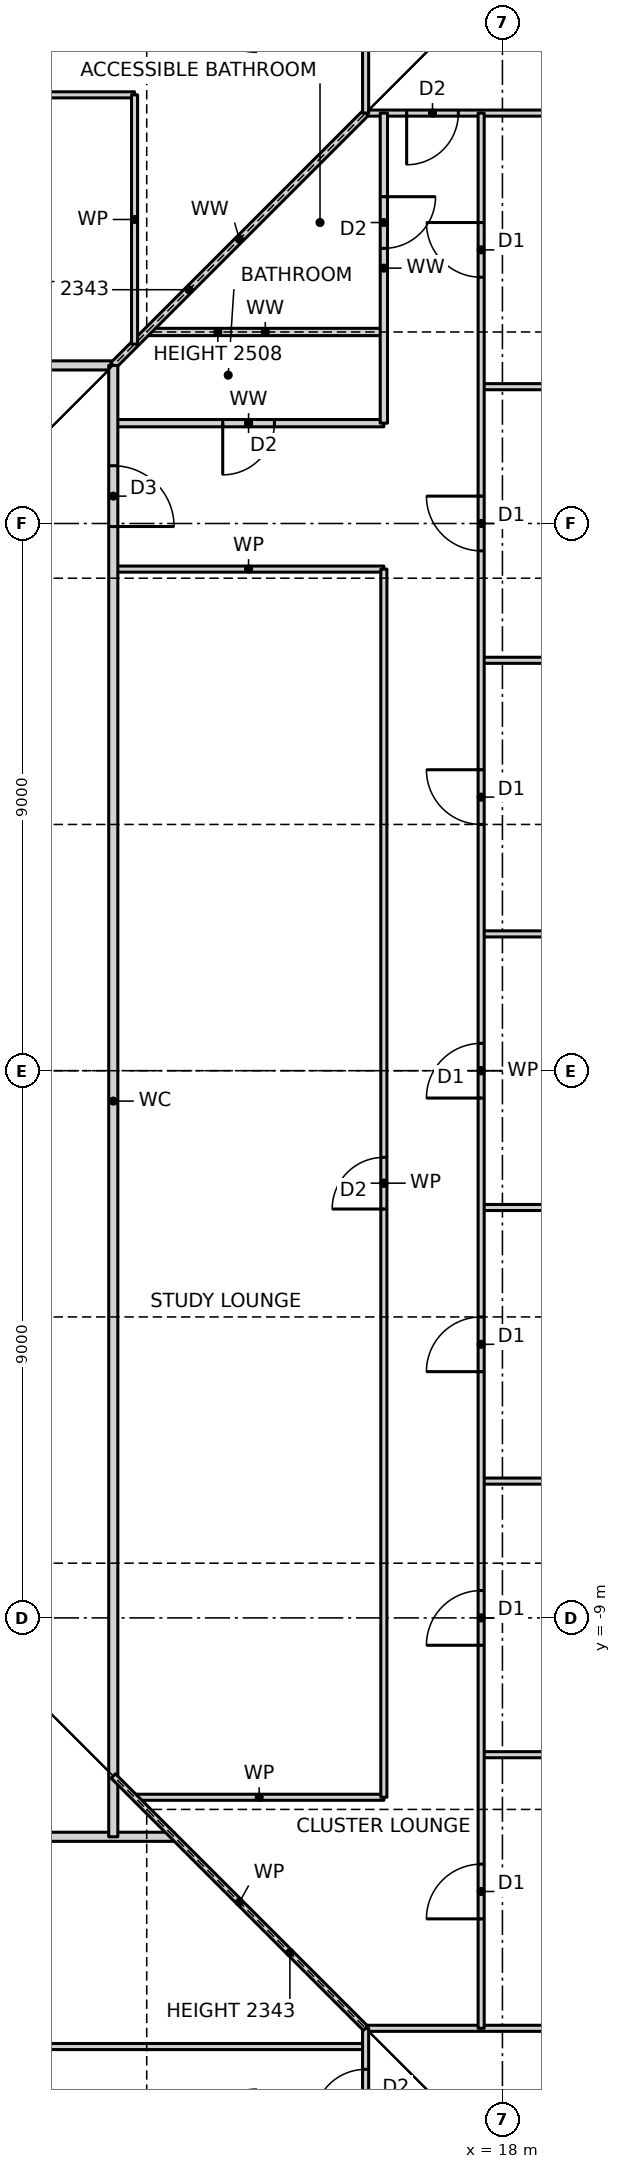
"""IFC4 building model, lengths in metres.
Left out: names, types, materials, properties, quantities, classifications, styles, units other than length and angle.
Written with IfcOpenShell. Run it as: python <this file> out.ifc"""

import sys

from ifc_helpers import new_model, si_unit, direction, frame, frame_2d, origin, place, context, subcontext, project, spatial, rectangle, extrude, element, fill, save


model = new_model("IFC4")
c1 = context("Model", 3, precision=1e-05, world=origin(), true_north=direction((0.0, 1.0)))
c2 = subcontext(c1, "Body", "Model", "MODEL_VIEW")
j1 = project(units=[si_unit("LENGTHUNIT", "METRE"), si_unit("PLANEANGLEUNIT", "RADIAN")], contexts=[c1])
p1 = place(None, origin())
s1 = spatial("IfcSite", under=j1, at=p1, CompositionType="ELEMENT")
p2 = place(p1, origin())
s2 = spatial("IfcBuilding", under=s1, at=p2, CompositionType="ELEMENT")
p3 = place(p2, frame((0.0, 0.0, 18.5)))
s3 = spatial("IfcBuildingStorey", under=s2, at=p3, CompositionType="ELEMENT", Elevation=18.5)
p4 = place(p3, frame((-2.15, -16.05, 0.0), z_axis=(0.0, 0.0, 1.0), x_axis=(1.0, 0.0, 0.0)))
e1 = element("IfcWall", 1, at=p4, inside=s3, PredefinedType="PARTITIONING", context=c2, shape_type="SweptSolid", body=[
    extrude(rectangle(XDim=17.9, YDim=0.1, at=frame_2d((8.95, 0.0))), origin(), (0.0, 0.0, 1.0), 3.27),
])
p5 = place(p4, frame((8.525, 0.0, 0.0)))
e2 = element("IfcOpeningElement", 2, at=p5, cuts=e1, PredefinedType="OPENING", context=c2, shape_type="SweptSolid", body=[
    extrude(rectangle(XDim=0.85, YDim=2.1, at=frame_2d((0.425, 1.05))), frame((0.0, 0.06, 0.0), z_axis=(0.0, -1.0, 0.0), x_axis=(1.0, 0.0, 0.0)), (0.0, 0.0, 1.0), 0.12),
])
p6 = place(p3, frame((15.75, -15.75, 0.0), z_axis=(0.0, 0.0, 1.0), x_axis=(1.0, 0.0, 0.0)))
e3 = element("IfcWall", 3, at=p6, inside=s3, PredefinedType="PARTITIONING", context=c2, shape_type="SweptSolid", body=[
    extrude(rectangle(XDim=7.44, YDim=0.1, at=frame_2d((3.72, 0.0))), origin(), (0.0, 0.0, 1.0), 3.27),
])
p7 = place(p3, frame((-12.6, -12.6, 0.0), z_axis=(0.0, 0.0, 1.0), x_axis=(1.0, 0.0, 0.0)))
e4 = element("IfcWall", 4, at=p7, inside=s3, PredefinedType="PARTITIONING", context=c2, shape_type="SweptSolid", body=[
    extrude(rectangle(XDim=25.2, YDim=0.15, at=frame_2d((12.6, 0.0))), origin(), (0.0, 0.0, 1.0), 3.27),
])
p8 = place(p7, frame((8.05, 0.0, 0.0)))
e5 = element("IfcOpeningElement", 5, at=p8, cuts=e4, PredefinedType="OPENING", context=c2, shape_type="SweptSolid", body=[
    extrude(rectangle(XDim=1.0, YDim=2.1, at=frame_2d((0.5, 1.05))), frame((0.0, 0.085, 0.0), z_axis=(0.0, -1.0, 0.0), x_axis=(1.0, 0.0, 0.0)), (0.0, 0.0, 1.0), 0.17),
])
p9 = place(p7, frame((5.3, 0.0, 0.0)))
e6 = element("IfcOpeningElement", 6, at=p9, cuts=e4, PredefinedType="OPENING", context=c2, shape_type="SweptSolid", body=[
    extrude(rectangle(XDim=0.9, YDim=2.1, at=frame_2d((0.45, 1.05))), frame((0.0, 0.085, 0.0), z_axis=(0.0, -1.0, 0.0), x_axis=(1.0, 0.0, 0.0)), (0.0, 0.0, 1.0), 0.17),
])
p10 = place(p3, frame((11.95, -11.95, 0.0), z_axis=(0.0, 0.0, 1.0), x_axis=(1.0, 0.0, 0.0)))
e7 = element("IfcWall", 7, at=p10, inside=s3, PredefinedType="PARTITIONING", context=c2, shape_type="SweptSolid", body=[
    extrude(rectangle(XDim=4.1, YDim=0.1, at=frame_2d((2.05, 0.0))), origin(), (0.0, 0.0, 1.0), 3.27),
])
for number, where, z_axis, x_axis in (
    (8, (17.65, -11.25, 0.0), (0.0, 0.0, 1.0), (1.0, 0.0, 0.0)),
    (9, (17.65, -6.75, 0.0), (0.0, 0.0, 1.0), (1.0, 0.0, 0.0)),
    (10, (17.65, -2.25, 0.0), (0.0, 0.0, 1.0), (1.0, 0.0, 0.0)),
    (11, (17.65, 2.25, 0.0), (0.0, 0.0, 1.0), (1.0, 0.0, 0.0)),
    (12, (17.65, 6.75, 0.0), (0.0, 0.0, 1.0), (1.0, 0.0, 0.0)),
):
    element("IfcWall", number, at=place(p3, frame(where, z_axis=z_axis, x_axis=x_axis)), inside=s3, PredefinedType="PARTITIONING", context=c2, shape_type="SweptSolid", body=[
        extrude(rectangle(XDim=5.54, YDim=0.1, at=frame_2d((2.77, 0.0))), origin(), (0.0, 0.0, 1.0), 3.27),
    ])
p11 = place(p3, frame((11.6, 8.25, 0.0), z_axis=(0.0, 0.0, 1.0), x_axis=(1.0, 0.0, 0.0)))
e13 = element("IfcWall", 13, at=p11, inside=s3, PredefinedType="PARTITIONING", context=c2, shape_type="SweptSolid", body=[
    extrude(rectangle(XDim=4.45, YDim=0.1, at=frame_2d((2.225, 0.0))), origin(), (0.0, 0.0, 1.0), 3.27),
])
p12 = place(p3, frame((11.6, 10.65, 0.0), z_axis=(0.0, 0.0, 1.0), x_axis=(1.0, 0.0, 0.0)))
e14 = element("IfcWall", 14, at=p12, inside=s3, PredefinedType="PARTITIONING", context=c2, shape_type="SweptSolid", body=[
    extrude(rectangle(XDim=4.45, YDim=0.12, at=frame_2d((2.225, 0.0))), origin(), (0.0, 0.0, 1.0), 3.27),
])
p13 = place(p12, frame((1.8, 0.0, 0.0)))
e15 = element("IfcOpeningElement", 15, at=p13, cuts=e14, PredefinedType="OPENING", context=c2, shape_type="SweptSolid", body=[
    extrude(rectangle(XDim=0.85, YDim=2.1, at=frame_2d((0.425, 1.05))), frame((0.0, 0.07, 0.0), z_axis=(0.0, -1.0, 0.0), x_axis=(1.0, 0.0, 0.0)), (0.0, 0.0, 1.0), 0.14),
])
p14 = place(p3, frame((17.65, 11.25, 0.0), z_axis=(0.0, 0.0, 1.0), x_axis=(1.0, 0.0, 0.0)))
e16 = element("IfcWall", 16, at=p14, inside=s3, PredefinedType="PARTITIONING", context=c2, shape_type="SweptSolid", body=[
    extrude(rectangle(XDim=5.54, YDim=0.1, at=frame_2d((2.77, 0.0))), origin(), (0.0, 0.0, 1.0), 3.27),
])
p15 = place(p3, frame((-11.6, 11.6, 0.0), z_axis=(0.0, 0.0, 1.0), x_axis=(1.0, 0.0, 0.0)))
e17 = element("IfcWall", 17, at=p15, inside=s3, PredefinedType="PARTITIONING", context=c2, shape_type="SweptSolid", body=[
    extrude(rectangle(XDim=23.2, YDim=0.15, at=frame_2d((11.6, 0.0))), origin(), (0.0, 0.0, 1.0), 3.27),
])
p16 = place(p15, frame((1.65, 0.0, 0.0)))
e18 = element("IfcOpeningElement", 18, at=p16, cuts=e17, PredefinedType="OPENING", context=c2, shape_type="SweptSolid", body=[
    extrude(rectangle(XDim=1.0, YDim=2.1, at=frame_2d((0.5, 1.05))), frame((0.0, 0.085, 0.0), z_axis=(0.0, -1.0, 0.0), x_axis=(1.0, 0.0, 0.0)), (0.0, 0.0, 1.0), 0.17),
])
p17 = place(p3, frame((12.15, 12.15, 0.0), z_axis=(0.0, 0.0, 1.0), x_axis=(1.0, 0.0, 0.0)))
e19 = element("IfcWall", 19, at=p17, inside=s3, PredefinedType="PARTITIONING", context=c2, shape_type="SweptSolid", body=[
    extrude(rectangle(XDim=3.9, YDim=0.12, at=frame_2d((1.95, 0.0))), origin(), (0.0, 0.0, 1.0), 2.508),
])
p18 = place(p3, frame((15.75, 15.75, 0.0), z_axis=(0.0, 0.0, 1.0), x_axis=(1.0, 0.0, 0.0)))
e20 = element("IfcWall", 20, at=p18, inside=s3, PredefinedType="PARTITIONING", context=c2, shape_type="SweptSolid", body=[
    extrude(rectangle(XDim=7.44, YDim=0.1, at=frame_2d((3.72, 0.0))), origin(), (0.0, 0.0, 1.0), 3.27),
])
p19 = place(p18, frame((0.675, 0.0, 0.0)))
e21 = element("IfcOpeningElement", 21, at=p19, cuts=e20, PredefinedType="OPENING", context=c2, shape_type="SweptSolid", body=[
    extrude(rectangle(XDim=0.85, YDim=2.1, at=frame_2d((0.425, 1.05))), frame((0.0, 0.06, 0.0), z_axis=(0.0, -1.0, 0.0), x_axis=(1.0, 0.0, 0.0)), (0.0, 0.0, 1.0), 0.12),
])
p20 = place(p3, frame((-8.25, 16.05, 0.0), z_axis=(0.0, 0.0, 1.0), x_axis=(1.0, 0.0, 0.0)))
e22 = element("IfcWall", 22, at=p20, inside=s3, PredefinedType="PARTITIONING", context=c2, shape_type="SweptSolid", body=[
    extrude(rectangle(XDim=20.2, YDim=0.1, at=frame_2d((10.1, 0.0))), origin(), (0.0, 0.0, 1.0), 3.27),
])
p21 = place(p20, frame((9.675, 0.0, 0.0)))
e23 = element("IfcOpeningElement", 23, at=p21, cuts=e22, PredefinedType="OPENING", context=c2, shape_type="SweptSolid", body=[
    extrude(rectangle(XDim=0.85, YDim=2.1, at=frame_2d((0.425, 1.05))), frame((0.0, 0.06, 0.0), z_axis=(0.0, -1.0, 0.0), x_axis=(1.0, 0.0, 0.0)), (0.0, 0.0, 1.0), 0.12),
])
p22 = place(p3, frame((11.6, 11.6, 0.0), z_axis=(0.0, 0.0, 1.0), x_axis=(0.707106781187, 0.707106781187, 0.0)))
e24 = element("IfcWall", 24, at=p22, inside=s3, PredefinedType="PARTITIONING", context=c2, shape_type="SweptSolid", body=[
    extrude(rectangle(XDim=5.869, YDim=0.12, at=frame_2d((2.935, 0.0))), origin(), (0.0, 0.0, 1.0), 2.343),
])
p23 = place(p3, frame((17.65, -15.75, 0.0), z_axis=(0.0, 0.0, 1.0), x_axis=(0.0, 1.0, 0.0)))
e25 = element("IfcWall", 25, at=p23, inside=s3, PredefinedType="PARTITIONING", context=c2, shape_type="SweptSolid", body=[
    extrude(rectangle(XDim=31.5, YDim=0.1, at=frame_2d((15.75, 0.0))), origin(), (0.0, 0.0, 1.0), 3.27),
])
p24 = place(p23, frame((1.8, 0.0, 0.0)))
e26 = element("IfcOpeningElement", 26, at=p24, cuts=e25, PredefinedType="OPENING", context=c2, shape_type="SweptSolid", body=[
    extrude(rectangle(XDim=0.9, YDim=2.1, at=frame_2d((0.45, 1.05))), frame((0.0, 0.06, 0.0), z_axis=(0.0, -1.0, 0.0), x_axis=(1.0, 0.0, 0.0)), (0.0, 0.0, 1.0), 0.12),
])
p25 = place(p23, frame((6.3, 0.0, 0.0)))
e27 = element("IfcOpeningElement", 27, at=p25, cuts=e25, PredefinedType="OPENING", context=c2, shape_type="SweptSolid", body=[
    extrude(rectangle(XDim=0.9, YDim=2.1, at=frame_2d((0.45, 1.05))), frame((0.0, 0.06, 0.0), z_axis=(0.0, -1.0, 0.0), x_axis=(1.0, 0.0, 0.0)), (0.0, 0.0, 1.0), 0.12),
])
p26 = place(p23, frame((10.8, 0.0, 0.0)))
e28 = element("IfcOpeningElement", 28, at=p26, cuts=e25, PredefinedType="OPENING", context=c2, shape_type="SweptSolid", body=[
    extrude(rectangle(XDim=0.9, YDim=2.1, at=frame_2d((0.45, 1.05))), frame((0.0, 0.06, 0.0), z_axis=(0.0, -1.0, 0.0), x_axis=(1.0, 0.0, 0.0)), (0.0, 0.0, 1.0), 0.12),
])
p27 = place(p23, frame((15.3, 0.0, 0.0)))
e29 = element("IfcOpeningElement", 29, at=p27, cuts=e25, PredefinedType="OPENING", context=c2, shape_type="SweptSolid", body=[
    extrude(rectangle(XDim=0.9, YDim=2.1, at=frame_2d((0.45, 1.05))), frame((0.0, 0.06, 0.0), z_axis=(0.0, -1.0, 0.0), x_axis=(1.0, 0.0, 0.0)), (0.0, 0.0, 1.0), 0.12),
])
p28 = place(p23, frame((19.8, 0.0, 0.0)))
e30 = element("IfcOpeningElement", 30, at=p28, cuts=e25, PredefinedType="OPENING", context=c2, shape_type="SweptSolid", body=[
    extrude(rectangle(XDim=0.9, YDim=2.1, at=frame_2d((0.45, 1.05))), frame((0.0, 0.06, 0.0), z_axis=(0.0, -1.0, 0.0), x_axis=(1.0, 0.0, 0.0)), (0.0, 0.0, 1.0), 0.12),
])
p29 = place(p23, frame((24.3, 0.0, 0.0)))
e31 = element("IfcOpeningElement", 31, at=p29, cuts=e25, PredefinedType="OPENING", context=c2, shape_type="SweptSolid", body=[
    extrude(rectangle(XDim=0.9, YDim=2.1, at=frame_2d((0.45, 1.05))), frame((0.0, 0.06, 0.0), z_axis=(0.0, -1.0, 0.0), x_axis=(1.0, 0.0, 0.0)), (0.0, 0.0, 1.0), 0.12),
])
p30 = place(p23, frame((28.8, 0.0, 0.0)))
e32 = element("IfcOpeningElement", 32, at=p30, cuts=e25, PredefinedType="OPENING", context=c2, shape_type="SweptSolid", body=[
    extrude(rectangle(XDim=0.9, YDim=2.1, at=frame_2d((0.45, 1.05))), frame((0.0, 0.06, 0.0), z_axis=(0.0, -1.0, 0.0), x_axis=(1.0, 0.0, 0.0)), (0.0, 0.0, 1.0), 0.12),
])
p31 = place(p3, frame((16.05, -11.95, 0.0), z_axis=(0.0, 0.0, 1.0), x_axis=(0.0, 1.0, 0.0)))
e33 = element("IfcWall", 33, at=p31, inside=s3, PredefinedType="PARTITIONING", context=c2, shape_type="SweptSolid", body=[
    extrude(rectangle(XDim=20.2, YDim=0.1, at=frame_2d((10.1, 0.0))), origin(), (0.0, 0.0, 1.0), 3.27),
])
p32 = place(p31, frame((9.675, 0.0, 0.0)))
e34 = element("IfcOpeningElement", 34, at=p32, cuts=e33, PredefinedType="OPENING", context=c2, shape_type="SweptSolid", body=[
    extrude(rectangle(XDim=0.85, YDim=2.1, at=frame_2d((0.425, 1.05))), frame((0.0, 0.06, 0.0), z_axis=(0.0, -1.0, 0.0), x_axis=(1.0, 0.0, 0.0)), (0.0, 0.0, 1.0), 0.12),
])
p33 = place(p3, frame((16.05, 10.65, 0.0), z_axis=(0.0, 0.0, 1.0), x_axis=(0.0, 1.0, 0.0)))
e35 = element("IfcWall", 35, at=p33, inside=s3, PredefinedType="PARTITIONING", context=c2, shape_type="SweptSolid", body=[
    extrude(rectangle(XDim=5.1, YDim=0.12, at=frame_2d((2.55, 0.0))), origin(), (0.0, 0.0, 1.0), 3.27),
])
p34 = place(p33, frame((2.875, 0.0, 0.0)))
e36 = element("IfcOpeningElement", 36, at=p34, cuts=e35, PredefinedType="OPENING", context=c2, shape_type="SweptSolid", body=[
    extrude(rectangle(XDim=0.85, YDim=2.1, at=frame_2d((0.425, 1.05))), frame((0.0, 0.07, 0.0), z_axis=(0.0, -1.0, 0.0), x_axis=(1.0, 0.0, 0.0)), (0.0, 0.0, 1.0), 0.14),
])
p35 = place(p3, frame((15.75, -23.19, 0.0), z_axis=(0.0, 0.0, 1.0), x_axis=(0.0, 1.0, 0.0)))
e37 = element("IfcWall", 37, at=p35, inside=s3, PredefinedType="PARTITIONING", context=c2, shape_type="SweptSolid", body=[
    extrude(rectangle(XDim=7.44, YDim=0.1, at=frame_2d((3.72, 0.0))), origin(), (0.0, 0.0, 1.0), 3.27),
])
p36 = place(p35, frame((5.915, 0.0, 0.0)))
e38 = element("IfcOpeningElement", 38, at=p36, cuts=e37, PredefinedType="OPENING", context=c2, shape_type="SweptSolid", body=[
    extrude(rectangle(XDim=0.85, YDim=2.1, at=frame_2d((0.425, 1.05))), frame((0.0, 0.06, 0.0), z_axis=(0.0, -1.0, 0.0), x_axis=(1.0, 0.0, 0.0)), (0.0, 0.0, 1.0), 0.12),
])
p37 = place(p3, frame((15.75, 15.75, 0.0), z_axis=(0.0, 0.0, 1.0), x_axis=(0.0, 1.0, 0.0)))
e39 = element("IfcWall", 39, at=p37, inside=s3, PredefinedType="PARTITIONING", context=c2, shape_type="SweptSolid", body=[
    extrude(rectangle(XDim=7.44, YDim=0.1, at=frame_2d((3.72, 0.0))), origin(), (0.0, 0.0, 1.0), 3.27),
])
p38 = place(p3, frame((11.95, 11.95, 0.0), z_axis=(0.0, 0.0, 1.0), x_axis=(0.0, 1.0, 0.0)))
e40 = element("IfcWall", 40, at=p38, inside=s3, PredefinedType="PARTITIONING", context=c2, shape_type="SweptSolid", body=[
    extrude(rectangle(XDim=4.1, YDim=0.1, at=frame_2d((2.05, 0.0))), origin(), (0.0, 0.0, 1.0), 3.27),
])
p39 = place(p3, frame((11.6, -12.6, 0.0), z_axis=(0.0, 0.0, 1.0), x_axis=(0.0, 1.0, 0.0)))
e41 = element("IfcWall", 41, at=p39, inside=s3, PredefinedType="PARTITIONING", context=c2, shape_type="SweptSolid", body=[
    extrude(rectangle(XDim=24.2, YDim=0.15, at=frame_2d((12.1, 0.0))), origin(), (0.0, 0.0, 1.0), 3.27),
])
p40 = place(p39, frame((21.55, 0.0, 0.0)))
e42 = element("IfcOpeningElement", 42, at=p40, cuts=e41, PredefinedType="OPENING", context=c2, shape_type="SweptSolid", body=[
    extrude(rectangle(XDim=1.0, YDim=2.1, at=frame_2d((0.5, 1.05))), frame((0.0, 0.085, 0.0), z_axis=(0.0, -1.0, 0.0), x_axis=(1.0, 0.0, 0.0)), (0.0, 0.0, 1.0), 0.17),
])
p41 = place(p3, frame((15.75, -15.75, 0.0), z_axis=(0.0, 0.0, 1.0), x_axis=(-0.707106781187, 0.707106781187, 0.0)))
e43 = element("IfcWall", 43, at=p41, inside=s3, PredefinedType="PARTITIONING", context=c2, shape_type="SweptSolid", body=[
    extrude(rectangle(XDim=5.869, YDim=0.1, at=frame_2d((2.935, 0.0))), origin(), (0.0, 0.0, 1.0), 2.343),
])
p42 = place(p24, origin())
e44 = element("IfcDoor", 44, at=p42, inside=s3, OperationType="SINGLE_SWING_LEFT", PredefinedType="DOOR", context=c2, shape_type="SweptSolid", body=[
    extrude(rectangle(XDim=0.9, YDim=2.1, at=frame_2d((0.45, 1.05))), frame((0.0, 0.025, 0.0), z_axis=(0.0, -1.0, 0.0), x_axis=(1.0, 0.0, 0.0)), (0.0, 0.0, 1.0), 0.05),
])
fill(e26, e44)
p43 = place(p25, origin())
e45 = element("IfcDoor", 45, at=p43, inside=s3, OperationType="SINGLE_SWING_LEFT", PredefinedType="DOOR", context=c2, shape_type="SweptSolid", body=[
    extrude(rectangle(XDim=0.9, YDim=2.1, at=frame_2d((0.45, 1.05))), frame((0.0, 0.025, 0.0), z_axis=(0.0, -1.0, 0.0), x_axis=(1.0, 0.0, 0.0)), (0.0, 0.0, 1.0), 0.05),
])
fill(e27, e45)
p44 = place(p26, origin())
e46 = element("IfcDoor", 46, at=p44, inside=s3, OperationType="SINGLE_SWING_LEFT", PredefinedType="DOOR", context=c2, shape_type="SweptSolid", body=[
    extrude(rectangle(XDim=0.9, YDim=2.1, at=frame_2d((0.45, 1.05))), frame((0.0, 0.025, 0.0), z_axis=(0.0, -1.0, 0.0), x_axis=(1.0, 0.0, 0.0)), (0.0, 0.0, 1.0), 0.05),
])
fill(e28, e46)
p45 = place(p27, origin())
e47 = element("IfcDoor", 47, at=p45, inside=s3, OperationType="SINGLE_SWING_LEFT", PredefinedType="DOOR", context=c2, shape_type="SweptSolid", body=[
    extrude(rectangle(XDim=0.9, YDim=2.1, at=frame_2d((0.45, 1.05))), frame((0.0, 0.025, 0.0), z_axis=(0.0, -1.0, 0.0), x_axis=(1.0, 0.0, 0.0)), (0.0, 0.0, 1.0), 0.05),
])
fill(e29, e47)
p46 = place(p28, origin())
e48 = element("IfcDoor", 48, at=p46, inside=s3, OperationType="SINGLE_SWING_RIGHT", PredefinedType="DOOR", context=c2, shape_type="SweptSolid", body=[
    extrude(rectangle(XDim=0.9, YDim=2.1, at=frame_2d((0.45, 1.05))), frame((0.0, 0.025, 0.0), z_axis=(0.0, -1.0, 0.0), x_axis=(1.0, 0.0, 0.0)), (0.0, 0.0, 1.0), 0.05),
])
fill(e30, e48)
p47 = place(p29, origin())
e49 = element("IfcDoor", 49, at=p47, inside=s3, OperationType="SINGLE_SWING_RIGHT", PredefinedType="DOOR", context=c2, shape_type="SweptSolid", body=[
    extrude(rectangle(XDim=0.9, YDim=2.1, at=frame_2d((0.45, 1.05))), frame((0.0, 0.025, 0.0), z_axis=(0.0, -1.0, 0.0), x_axis=(1.0, 0.0, 0.0)), (0.0, 0.0, 1.0), 0.05),
])
fill(e31, e49)
p48 = place(p30, origin())
e50 = element("IfcDoor", 50, at=p48, inside=s3, OperationType="SINGLE_SWING_RIGHT", PredefinedType="DOOR", context=c2, shape_type="SweptSolid", body=[
    extrude(rectangle(XDim=0.9, YDim=2.1, at=frame_2d((0.45, 1.05))), frame((0.0, 0.025, 0.0), z_axis=(0.0, -1.0, 0.0), x_axis=(1.0, 0.0, 0.0)), (0.0, 0.0, 1.0), 0.05),
])
fill(e32, e50)
p49 = place(p40, frame((1.0, 0.0, 0.0), z_axis=(0.0, 0.0, 1.0), x_axis=(-1.0, 0.0, 0.0)))
e51 = element("IfcDoor", 51, at=p49, inside=s3, OperationType="SINGLE_SWING_RIGHT", PredefinedType="DOOR", context=c2, shape_type="SweptSolid", body=[
    extrude(rectangle(XDim=1.0, YDim=2.1, at=frame_2d((0.5, 1.05))), frame((0.0, 0.025, 0.0), z_axis=(0.0, -1.0, 0.0), x_axis=(1.0, 0.0, 0.0)), (0.0, 0.0, 1.0), 0.05),
])
fill(e42, e51)
p50 = place(p32, origin())
e52 = element("IfcDoor", 52, at=p50, inside=s3, OperationType="SINGLE_SWING_LEFT", PredefinedType="DOOR", context=c2, shape_type="SweptSolid", body=[
    extrude(rectangle(XDim=0.85, YDim=2.1, at=frame_2d((0.425, 1.05))), frame((0.0, 0.025, 0.0), z_axis=(0.0, -1.0, 0.0), x_axis=(1.0, 0.0, 0.0)), (0.0, 0.0, 1.0), 0.05),
])
fill(e34, e52)
p51 = place(p13, frame((0.85, 0.0, 0.0), z_axis=(0.0, 0.0, 1.0), x_axis=(-1.0, 0.0, 0.0)))
e53 = element("IfcDoor", 53, at=p51, inside=s3, OperationType="SINGLE_SWING_RIGHT", PredefinedType="DOOR", context=c2, shape_type="SweptSolid", body=[
    extrude(rectangle(XDim=0.85, YDim=2.1, at=frame_2d((0.425, 1.05))), frame((0.0, 0.025, 0.0), z_axis=(0.0, -1.0, 0.0), x_axis=(1.0, 0.0, 0.0)), (0.0, 0.0, 1.0), 0.05),
])
fill(e15, e53)
p52 = place(p34, frame((0.85, 0.0, 0.0), z_axis=(0.0, 0.0, 1.0), x_axis=(-1.0, 0.0, 0.0)))
e54 = element("IfcDoor", 54, at=p52, inside=s3, OperationType="SINGLE_SWING_LEFT", PredefinedType="DOOR", context=c2, shape_type="SweptSolid", body=[
    extrude(rectangle(XDim=0.85, YDim=2.1, at=frame_2d((0.425, 1.05))), frame((0.0, 0.025, 0.0), z_axis=(0.0, -1.0, 0.0), x_axis=(1.0, 0.0, 0.0)), (0.0, 0.0, 1.0), 0.05),
])
fill(e36, e54)
p53 = place(p36, origin())
e55 = element("IfcDoor", 55, at=p53, inside=s3, OperationType="SINGLE_SWING_LEFT", PredefinedType="DOOR", context=c2, shape_type="SweptSolid", body=[
    extrude(rectangle(XDim=0.85, YDim=2.1, at=frame_2d((0.425, 1.05))), frame((0.0, 0.025, 0.0), z_axis=(0.0, -1.0, 0.0), x_axis=(1.0, 0.0, 0.0)), (0.0, 0.0, 1.0), 0.05),
])
fill(e38, e55)
p54 = place(p19, frame((0.85, 0.0, 0.0), z_axis=(0.0, 0.0, 1.0), x_axis=(-1.0, 0.0, 0.0)))
e56 = element("IfcDoor", 56, at=p54, inside=s3, OperationType="SINGLE_SWING_RIGHT", PredefinedType="DOOR", context=c2, shape_type="SweptSolid", body=[
    extrude(rectangle(XDim=0.85, YDim=2.1, at=frame_2d((0.425, 1.05))), frame((0.0, 0.025, 0.0), z_axis=(0.0, -1.0, 0.0), x_axis=(1.0, 0.0, 0.0)), (0.0, 0.0, 1.0), 0.05),
])
fill(e21, e56)
save(model, sys.argv[1])
